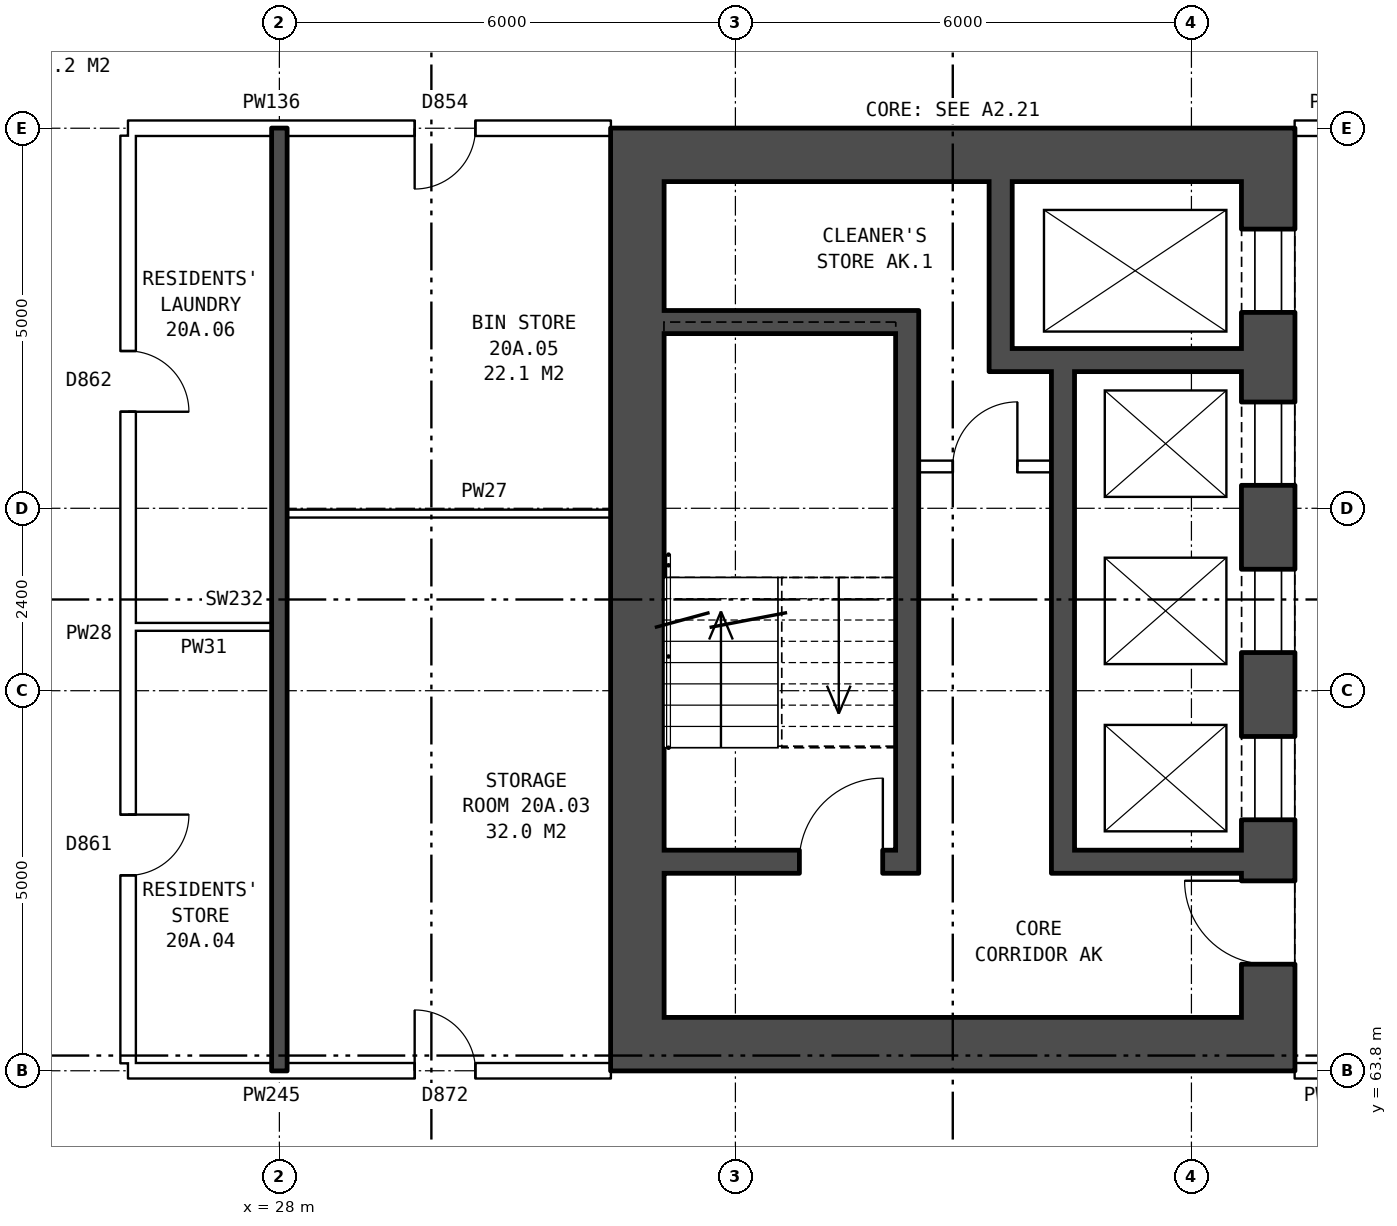
"""IFC4 building model, lengths in metres.
Left out: names, types, materials, properties, quantities, classifications, styles, units other than length and angle.
Written with IfcOpenShell. Run it as: python <this file> out.ifc"""

import sys

from ifc_helpers import new_model, si_unit, direction, frame, frame_2d, origin, place, context, subcontext, project, spatial, rectangle, extrude, element, fill, save


model = new_model("IFC4")
c1 = context("Model", 3, precision=1e-05, world=origin(), true_north=direction((0.0, 1.0)))
c2 = subcontext(c1, "Body", "Model", "MODEL_VIEW")
j1 = project(units=[si_unit("LENGTHUNIT", "METRE"), si_unit("PLANEANGLEUNIT", "RADIAN")], contexts=[c1])
p1 = place(None, origin())
s1 = spatial("IfcSite", under=j1, at=p1, CompositionType="ELEMENT")
p2 = place(p1, origin())
s2 = spatial("IfcBuilding", under=s1, at=p2, CompositionType="ELEMENT")
p3 = place(p2, frame((0.0, 0.0, 74.7)))
s3 = spatial("IfcBuildingStorey", under=s2, at=p3, CompositionType="ELEMENT", Elevation=74.7)
p4 = place(p3, frame((41.01, 75.5, 0.0), z_axis=(0.0, 0.0, 1.0), x_axis=(0.0, -1.0, 0.0)))
e1 = element("IfcWall", 1, at=p4, inside=s3, PredefinedType="SHEAR", context=c2, shape_type="SweptSolid", body=[
    extrude(rectangle(XDim=11.0, YDim=0.7, at=frame_2d((5.5, 0.0))), origin(), (0.0, 0.0, 1.0), 2.85),
])
p5 = place(p4, frame((0.625, 0.0, 0.0)))
e2 = element("IfcOpeningElement", 2, at=p5, cuts=e1, PredefinedType="OPENING", context=c2, shape_type="SweptSolid", body=[
    extrude(rectangle(XDim=1.1, YDim=2.1, at=frame_2d((0.55, 1.05))), frame((0.0, 0.36, 0.0), z_axis=(0.0, -1.0, 0.0), x_axis=(1.0, 0.0, 0.0)), (0.0, 0.0, 1.0), 0.72),
])
p6 = place(p4, frame((2.9, 0.0, 0.0)))
e3 = element("IfcOpeningElement", 3, at=p6, cuts=e1, PredefinedType="OPENING", context=c2, shape_type="SweptSolid", body=[
    extrude(rectangle(XDim=1.1, YDim=2.1, at=frame_2d((0.55, 1.05))), frame((0.0, 0.36, 0.0), z_axis=(0.0, -1.0, 0.0), x_axis=(1.0, 0.0, 0.0)), (0.0, 0.0, 1.0), 0.72),
])
p7 = place(p4, frame((5.1, 0.0, 0.0)))
e4 = element("IfcOpeningElement", 4, at=p7, cuts=e1, PredefinedType="OPENING", context=c2, shape_type="SweptSolid", body=[
    extrude(rectangle(XDim=1.1, YDim=2.1, at=frame_2d((0.55, 1.05))), frame((0.0, 0.36, 0.0), z_axis=(0.0, -1.0, 0.0), x_axis=(1.0, 0.0, 0.0)), (0.0, 0.0, 1.0), 0.72),
])
p8 = place(p4, frame((7.3, 0.0, 0.0)))
e5 = element("IfcOpeningElement", 5, at=p8, cuts=e1, PredefinedType="OPENING", context=c2, shape_type="SweptSolid", body=[
    extrude(rectangle(XDim=1.1, YDim=2.1, at=frame_2d((0.55, 1.05))), frame((0.0, 0.36, 0.0), z_axis=(0.0, -1.0, 0.0), x_axis=(1.0, 0.0, 0.0)), (0.0, 0.0, 1.0), 0.72),
])
p9 = place(p4, frame((9.2, 0.0, 0.0)))
e6 = element("IfcOpeningElement", 6, at=p9, cuts=e1, PredefinedType="OPENING", context=c2, shape_type="SweptSolid", body=[
    extrude(rectangle(XDim=1.1, YDim=2.1, at=frame_2d((0.55, 1.05))), frame((0.0, 0.36, 0.0), z_axis=(0.0, -1.0, 0.0), x_axis=(1.0, 0.0, 0.0)), (0.0, 0.0, 1.0), 0.72),
])
p10 = place(p3, frame((32.71, 75.5, 0.0), z_axis=(0.0, 0.0, 1.0), x_axis=(0.0, -1.0, 0.0)))
e7 = element("IfcWall", 7, at=p10, inside=s3, PredefinedType="SHEAR", context=c2, shape_type="SweptSolid", body=[
    extrude(rectangle(XDim=11.0, YDim=0.7, at=frame_2d((5.5, 0.0))), origin(), (0.0, 0.0, 1.0), 2.85),
])
for number, where, z_axis, x_axis in (
    (8, (41.36, 75.85, 0.0), (0.0, 0.0, 1.0), (-1.0, 0.0, 0.0)),
    (9, (41.36, 64.15, 0.0), (0.0, 0.0, 1.0), (-1.0, 0.0, 0.0)),
):
    element("IfcWall", number, at=place(p3, frame(where, z_axis=z_axis, x_axis=x_axis)), inside=s3, PredefinedType="SHEAR", context=c2, shape_type="SweptSolid", body=[
        extrude(rectangle(XDim=9.0, YDim=0.7, at=frame_2d((4.5, 0.0))), origin(), (0.0, 0.0, 1.0), 2.85),
    ])
p11 = place(p3, frame((36.11, 73.65, 0.0), z_axis=(0.0, 0.0, 1.0), x_axis=(-1.0, 0.0, 0.0)))
e10 = element("IfcWall", 10, at=p11, inside=s3, PredefinedType="SHEAR", context=c2, shape_type="SweptSolid", body=[
    extrude(rectangle(XDim=3.05, YDim=0.3, at=frame_2d((1.525, 0.0))), origin(), (0.0, 0.0, 1.0), 2.85),
])
p12 = place(p3, frame((40.66, 73.15, 0.0), z_axis=(0.0, 0.0, 1.0), x_axis=(-1.0, 0.0, 0.0)))
e11 = element("IfcWall", 11, at=p12, inside=s3, PredefinedType="SHEAR", context=c2, shape_type="SweptSolid", body=[
    extrude(rectangle(XDim=3.32, YDim=0.3, at=frame_2d((1.66, 0.0))), origin(), (0.0, 0.0, 1.0), 2.85),
])
p13 = place(p3, frame((38.16, 71.75, 0.0), z_axis=(0.0, 0.0, 1.0), x_axis=(-1.0, 0.0, 0.0)))
e12 = element("IfcWall", 12, at=p13, inside=s3, PredefinedType="PARTITIONING", context=c2, shape_type="SweptSolid", body=[
    extrude(rectangle(XDim=1.75, YDim=0.15, at=frame_2d((0.875, 0.0))), origin(), (0.0, 0.0, 1.0), 2.85),
])
p14 = place(p13, frame((0.45, 0.0, 0.0)))
e13 = element("IfcOpeningElement", 13, at=p14, cuts=e12, PredefinedType="OPENING", context=c2, shape_type="SweptSolid", body=[
    extrude(rectangle(XDim=0.85, YDim=2.1, at=frame_2d((0.425, 1.05))), frame((0.0, 0.085, 0.0), z_axis=(0.0, -1.0, 0.0), x_axis=(1.0, 0.0, 0.0)), (0.0, 0.0, 1.0), 0.17),
])
p15 = place(p3, frame((40.66, 66.55, 0.0), z_axis=(0.0, 0.0, 1.0), x_axis=(-1.0, 0.0, 0.0)))
e14 = element("IfcWall", 14, at=p15, inside=s3, PredefinedType="SHEAR", context=c2, shape_type="SweptSolid", body=[
    extrude(rectangle(XDim=2.2, YDim=0.3, at=frame_2d((1.1, 0.0))), origin(), (0.0, 0.0, 1.0), 2.85),
])
p16 = place(p3, frame((36.11, 66.55, 0.0), z_axis=(0.0, 0.0, 1.0), x_axis=(-1.0, 0.0, 0.0)))
e15 = element("IfcWall", 15, at=p16, inside=s3, PredefinedType="SHEAR", context=c2, shape_type="SweptSolid", body=[
    extrude(rectangle(XDim=3.05, YDim=0.3, at=frame_2d((1.525, 0.0))), origin(), (0.0, 0.0, 1.0), 2.85),
])
p17 = place(p16, frame((0.17, 0.0, 0.0)))
e16 = element("IfcOpeningElement", 16, at=p17, cuts=e15, PredefinedType="OPENING", context=c2, shape_type="SweptSolid", body=[
    extrude(rectangle(XDim=1.1, YDim=2.1, at=frame_2d((0.55, 1.05))), frame((0.0, 0.16, 0.0), z_axis=(0.0, -1.0, 0.0), x_axis=(1.0, 0.0, 0.0)), (0.0, 0.0, 1.0), 0.32),
])
p18 = place(p3, frame((38.31, 73.0, 0.0), z_axis=(0.0, 0.0, 1.0), x_axis=(0.0, -1.0, 0.0)))
e17 = element("IfcWall", 17, at=p18, inside=s3, PredefinedType="SHEAR", context=c2, shape_type="SweptSolid", body=[
    extrude(rectangle(XDim=6.6, YDim=0.3, at=frame_2d((3.3, 0.0))), origin(), (0.0, 0.0, 1.0), 2.85),
])
p19 = place(p3, frame((37.49, 75.5, 0.0), z_axis=(0.0, 0.0, 1.0), x_axis=(0.0, -1.0, 0.0)))
e18 = element("IfcWall", 18, at=p19, inside=s3, PredefinedType="SHEAR", context=c2, shape_type="SweptSolid", body=[
    extrude(rectangle(XDim=2.2, YDim=0.3, at=frame_2d((1.1, 0.0))), origin(), (0.0, 0.0, 1.0), 2.85),
])
p20 = place(p3, frame((36.26, 73.8, 0.0), z_axis=(0.0, 0.0, 1.0), x_axis=(0.0, -1.0, 0.0)))
e19 = element("IfcWall", 19, at=p20, inside=s3, PredefinedType="SHEAR", context=c2, shape_type="SweptSolid", body=[
    extrude(rectangle(XDim=7.4, YDim=0.3, at=frame_2d((3.7, 0.0))), origin(), (0.0, 0.0, 1.0), 2.85),
])
p21 = place(p3, frame((26.01, 63.8, 0.0), z_axis=(0.0, 0.0, 1.0), x_axis=(1.0, 0.0, 0.0)))
e20 = element("IfcWall", 20, at=p21, inside=s3, PredefinedType="PARTITIONING", context=c2, shape_type="SweptSolid", body=[
    extrude(rectangle(XDim=6.35, YDim=0.2, at=frame_2d((3.175, 0.0))), origin(), (0.0, 0.0, 1.0), 2.85),
])
p22 = place(p21, frame((3.77, 0.0, 0.0)))
e21 = element("IfcOpeningElement", 21, at=p22, cuts=e20, PredefinedType="OPENING", context=c2, shape_type="SweptSolid", body=[
    extrude(rectangle(XDim=0.8, YDim=2.1, at=frame_2d((0.4, 1.05))), frame((0.0, 0.11, 0.0), z_axis=(0.0, -1.0, 0.0), x_axis=(1.0, 0.0, 0.0)), (0.0, 0.0, 1.0), 0.22),
])
p23 = place(p3, frame((41.36, 63.8, 0.0), z_axis=(0.0, 0.0, 1.0), x_axis=(1.0, 0.0, 0.0)))
e22 = element("IfcWall", 22, at=p23, inside=s3, PredefinedType="PARTITIONING", context=c2, shape_type="SweptSolid", body=[
    extrude(rectangle(XDim=3.0, YDim=0.2, at=frame_2d((1.5, 0.0))), origin(), (0.0, 0.0, 1.0), 2.85),
])
p24 = place(p23, frame((1.0, 0.0, 0.0)))
e23 = element("IfcOpeningElement", 23, at=p24, cuts=e22, PredefinedType="OPENING", context=c2, shape_type="SweptSolid", body=[
    extrude(rectangle(XDim=1.0, YDim=2.1, at=frame_2d((0.5, 1.05))), frame((0.0, 0.11, 0.0), z_axis=(0.0, -1.0, 0.0), x_axis=(1.0, 0.0, 0.0)), (0.0, 0.0, 1.0), 0.22),
])
p25 = place(p3, frame((26.11, 69.64, 0.0), z_axis=(0.0, 0.0, 1.0), x_axis=(1.0, 0.0, 0.0)))
e24 = element("IfcWall", 24, at=p25, inside=s3, PredefinedType="PARTITIONING", context=c2, shape_type="SweptSolid", body=[
    extrude(rectangle(XDim=1.79, YDim=0.1, at=frame_2d((0.895, 0.0))), origin(), (0.0, 0.0, 1.0), 2.85),
])
p26 = place(p3, frame((28.1, 71.13, 0.0), z_axis=(0.0, 0.0, 1.0), x_axis=(1.0, 0.0, 0.0)))
e25 = element("IfcWall", 25, at=p26, inside=s3, PredefinedType="PARTITIONING", context=c2, shape_type="SweptSolid", body=[
    extrude(rectangle(XDim=4.26, YDim=0.1, at=frame_2d((2.13, 0.0))), origin(), (0.0, 0.0, 1.0), 2.85),
])
p27 = place(p3, frame((26.01, 76.2, 0.0), z_axis=(0.0, 0.0, 1.0), x_axis=(1.0, 0.0, 0.0)))
e26 = element("IfcWall", 26, at=p27, inside=s3, PredefinedType="PARTITIONING", context=c2, shape_type="SweptSolid", body=[
    extrude(rectangle(XDim=6.35, YDim=0.2, at=frame_2d((3.175, 0.0))), origin(), (0.0, 0.0, 1.0), 2.85),
])
p28 = place(p27, frame((3.77, 0.0, 0.0)))
e27 = element("IfcOpeningElement", 27, at=p28, cuts=e26, PredefinedType="OPENING", context=c2, shape_type="SweptSolid", body=[
    extrude(rectangle(XDim=0.8, YDim=2.1, at=frame_2d((0.4, 1.05))), frame((0.0, 0.11, 0.0), z_axis=(0.0, -1.0, 0.0), x_axis=(1.0, 0.0, 0.0)), (0.0, 0.0, 1.0), 0.22),
])
p29 = place(p3, frame((41.36, 76.2, 0.0), z_axis=(0.0, 0.0, 1.0), x_axis=(1.0, 0.0, 0.0)))
e28 = element("IfcWall", 28, at=p29, inside=s3, PredefinedType="PARTITIONING", context=c2, shape_type="SweptSolid", body=[
    extrude(rectangle(XDim=3.0, YDim=0.2, at=frame_2d((1.5, 0.0))), origin(), (0.0, 0.0, 1.0), 2.85),
])
p30 = place(p29, frame((1.0, 0.0, 0.0)))
e29 = element("IfcOpeningElement", 29, at=p30, cuts=e28, PredefinedType="OPENING", context=c2, shape_type="SweptSolid", body=[
    extrude(rectangle(XDim=1.0, YDim=2.1, at=frame_2d((0.5, 1.05))), frame((0.0, 0.11, 0.0), z_axis=(0.0, -1.0, 0.0), x_axis=(1.0, 0.0, 0.0)), (0.0, 0.0, 1.0), 0.22),
])
p31 = place(p3, frame((26.01, 63.9, 0.0), z_axis=(0.0, 0.0, 1.0), x_axis=(0.0, 1.0, 0.0)))
e30 = element("IfcWall", 30, at=p31, inside=s3, PredefinedType="PARTITIONING", context=c2, shape_type="SweptSolid", body=[
    extrude(rectangle(XDim=12.2, YDim=0.2, at=frame_2d((6.1, 0.0))), origin(), (0.0, 0.0, 1.0), 2.85),
])
p32 = place(p31, frame((2.47, 0.0, 0.0)))
e31 = element("IfcOpeningElement", 31, at=p32, cuts=e30, PredefinedType="OPENING", context=c2, shape_type="SweptSolid", body=[
    extrude(rectangle(XDim=0.8, YDim=2.1, at=frame_2d((0.4, 1.05))), frame((0.0, 0.11, 0.0), z_axis=(0.0, -1.0, 0.0), x_axis=(1.0, 0.0, 0.0)), (0.0, 0.0, 1.0), 0.22),
])
p33 = place(p31, frame((8.57, 0.0, 0.0)))
e32 = element("IfcOpeningElement", 32, at=p33, cuts=e30, PredefinedType="OPENING", context=c2, shape_type="SweptSolid", body=[
    extrude(rectangle(XDim=0.8, YDim=2.1, at=frame_2d((0.4, 1.05))), frame((0.0, 0.11, 0.0), z_axis=(0.0, -1.0, 0.0), x_axis=(1.0, 0.0, 0.0)), (0.0, 0.0, 1.0), 0.22),
])
p34 = place(p3, frame((28.0, 63.8, 0.0), z_axis=(0.0, 0.0, 1.0), x_axis=(0.0, 1.0, 0.0)))
e33 = element("IfcWall", 33, at=p34, inside=s3, PredefinedType="SOLIDWALL", context=c2, shape_type="SweptSolid", body=[
    extrude(rectangle(XDim=12.4, YDim=0.2, at=frame_2d((6.2, 0.0))), origin(), (0.0, 0.0, 1.0), 2.85),
])
p35 = place(p5, origin())
e34 = element("IfcDoor", 34, at=p35, inside=s3, OperationType="DOUBLE_DOOR_SLIDING", PredefinedType="DOOR", context=c2, shape_type="SweptSolid", body=[
    extrude(rectangle(XDim=1.1, YDim=2.1, at=frame_2d((0.55, 1.05))), frame((0.0, -0.285, 0.0), z_axis=(0.0, -1.0, 0.0), x_axis=(1.0, 0.0, 0.0)), (0.0, 0.0, 1.0), 0.05),
])
fill(e2, e34)
p36 = place(p6, origin())
e35 = element("IfcDoor", 35, at=p36, inside=s3, OperationType="DOUBLE_DOOR_SLIDING", PredefinedType="DOOR", context=c2, shape_type="SweptSolid", body=[
    extrude(rectangle(XDim=1.1, YDim=2.1, at=frame_2d((0.55, 1.05))), frame((0.0, -0.285, 0.0), z_axis=(0.0, -1.0, 0.0), x_axis=(1.0, 0.0, 0.0)), (0.0, 0.0, 1.0), 0.05),
])
fill(e3, e35)
p37 = place(p7, origin())
e36 = element("IfcDoor", 36, at=p37, inside=s3, OperationType="DOUBLE_DOOR_SLIDING", PredefinedType="DOOR", context=c2, shape_type="SweptSolid", body=[
    extrude(rectangle(XDim=1.1, YDim=2.1, at=frame_2d((0.55, 1.05))), frame((0.0, -0.285, 0.0), z_axis=(0.0, -1.0, 0.0), x_axis=(1.0, 0.0, 0.0)), (0.0, 0.0, 1.0), 0.05),
])
fill(e4, e36)
p38 = place(p8, origin())
e37 = element("IfcDoor", 37, at=p38, inside=s3, OperationType="DOUBLE_DOOR_SLIDING", PredefinedType="DOOR", context=c2, shape_type="SweptSolid", body=[
    extrude(rectangle(XDim=1.1, YDim=2.1, at=frame_2d((0.55, 1.05))), frame((0.0, -0.285, 0.0), z_axis=(0.0, -1.0, 0.0), x_axis=(1.0, 0.0, 0.0)), (0.0, 0.0, 1.0), 0.05),
])
fill(e5, e37)
p39 = place(p9, frame((1.1, 0.0, 0.0), z_axis=(0.0, 0.0, 1.0), x_axis=(-1.0, 0.0, 0.0)))
e38 = element("IfcDoor", 38, at=p39, inside=s3, OperationType="SINGLE_SWING_RIGHT", PredefinedType="DOOR", context=c2, shape_type="SweptSolid", body=[
    extrude(rectangle(XDim=1.1, YDim=2.1, at=frame_2d((0.55, 1.05))), frame((0.0, 0.335, 0.0), z_axis=(0.0, -1.0, 0.0), x_axis=(1.0, 0.0, 0.0)), (0.0, 0.0, 1.0), 0.05),
])
fill(e6, e38)
p40 = place(p17, frame((1.1, 0.0, 0.0), z_axis=(0.0, 0.0, 1.0), x_axis=(-1.0, 0.0, 0.0)))
e39 = element("IfcDoor", 39, at=p40, inside=s3, OperationType="SINGLE_SWING_RIGHT", PredefinedType="DOOR", context=c2, shape_type="SweptSolid", body=[
    extrude(rectangle(XDim=1.1, YDim=2.1, at=frame_2d((0.55, 1.05))), frame((0.0, 0.025, 0.0), z_axis=(0.0, -1.0, 0.0), x_axis=(1.0, 0.0, 0.0)), (0.0, 0.0, 1.0), 0.05),
])
fill(e16, e39)
p41 = place(p14, frame((0.85, 0.0, 0.0), z_axis=(0.0, 0.0, 1.0), x_axis=(-1.0, 0.0, 0.0)))
e40 = element("IfcDoor", 40, at=p41, inside=s3, OperationType="SINGLE_SWING_RIGHT", PredefinedType="DOOR", context=c2, shape_type="SweptSolid", body=[
    extrude(rectangle(XDim=0.85, YDim=2.1, at=frame_2d((0.425, 1.05))), frame((0.0, 0.025, 0.0), z_axis=(0.0, -1.0, 0.0), x_axis=(1.0, 0.0, 0.0)), (0.0, 0.0, 1.0), 0.05),
])
fill(e13, e40)
p42 = place(p22, origin())
e41 = element("IfcDoor", 41, at=p42, inside=s3, OperationType="SINGLE_SWING_LEFT", PredefinedType="DOOR", context=c2, shape_type="SweptSolid", body=[
    extrude(rectangle(XDim=0.8, YDim=2.1, at=frame_2d((0.4, 1.05))), frame((0.0, 0.025, 0.0), z_axis=(0.0, -1.0, 0.0), x_axis=(1.0, 0.0, 0.0)), (0.0, 0.0, 1.0), 0.05),
])
fill(e21, e41)
p43 = place(p32, frame((0.8, 0.0, 0.0), z_axis=(0.0, 0.0, 1.0), x_axis=(-1.0, 0.0, 0.0)))
e42 = element("IfcDoor", 42, at=p43, inside=s3, OperationType="SINGLE_SWING_LEFT", PredefinedType="DOOR", context=c2, shape_type="SweptSolid", body=[
    extrude(rectangle(XDim=0.8, YDim=2.1, at=frame_2d((0.4, 1.05))), frame((0.0, 0.025, 0.0), z_axis=(0.0, -1.0, 0.0), x_axis=(1.0, 0.0, 0.0)), (0.0, 0.0, 1.0), 0.05),
])
fill(e31, e42)
p44 = place(p28, frame((0.8, 0.0, 0.0), z_axis=(0.0, 0.0, 1.0), x_axis=(-1.0, 0.0, 0.0)))
e43 = element("IfcDoor", 43, at=p44, inside=s3, OperationType="SINGLE_SWING_RIGHT", PredefinedType="DOOR", context=c2, shape_type="SweptSolid", body=[
    extrude(rectangle(XDim=0.8, YDim=2.1, at=frame_2d((0.4, 1.05))), frame((0.0, 0.025, 0.0), z_axis=(0.0, -1.0, 0.0), x_axis=(1.0, 0.0, 0.0)), (0.0, 0.0, 1.0), 0.05),
])
fill(e27, e43)
p45 = place(p33, frame((0.8, 0.0, 0.0), z_axis=(0.0, 0.0, 1.0), x_axis=(-1.0, 0.0, 0.0)))
e44 = element("IfcDoor", 44, at=p45, inside=s3, OperationType="SINGLE_SWING_RIGHT", PredefinedType="DOOR", context=c2, shape_type="SweptSolid", body=[
    extrude(rectangle(XDim=0.8, YDim=2.1, at=frame_2d((0.4, 1.05))), frame((0.0, 0.025, 0.0), z_axis=(0.0, -1.0, 0.0), x_axis=(1.0, 0.0, 0.0)), (0.0, 0.0, 1.0), 0.05),
])
fill(e32, e44)
save(model, sys.argv[1])
